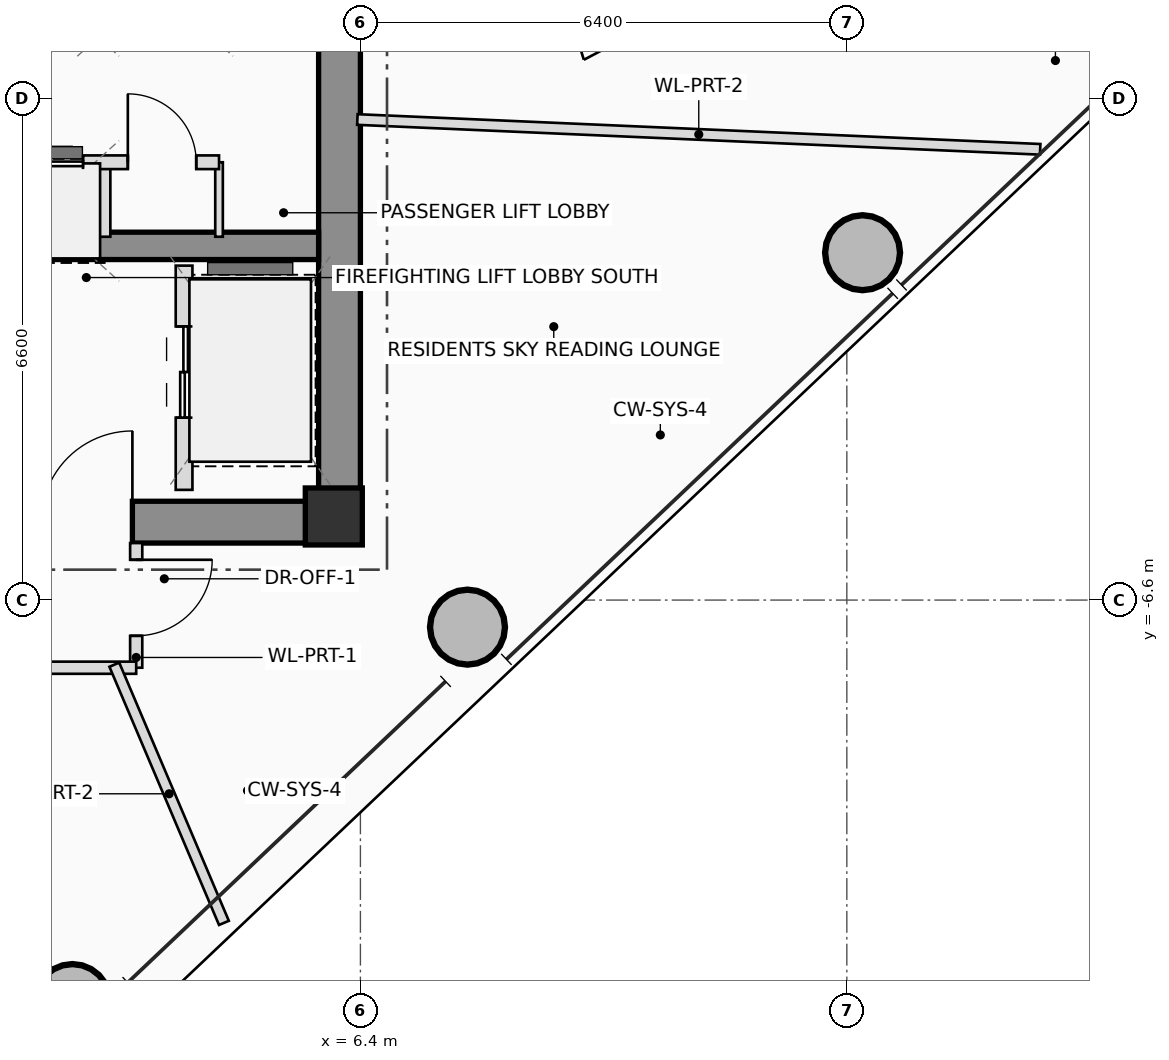
"""IFC4 building model, lengths in metres.
Left out: names, types, materials, properties, quantities, classifications, styles, units other than length and angle.
Written with IfcOpenShell. Run it as: python <this file> out.ifc"""

import sys

from ifc_helpers import new_model, si_unit, direction, frame, frame_2d, origin, origin_2d, place, context, subcontext, project, spatial, rectangle, hollow_circle, extrude, source, transform, mapped, element, fill, save


model = new_model("IFC4")
c1 = context("Model", 3, precision=1e-05, world=origin(), true_north=direction((0.0, 1.0)))
c2 = subcontext(c1, "Body", "Model", "MODEL_VIEW")
j1 = project(units=[si_unit("LENGTHUNIT", "METRE"), si_unit("PLANEANGLEUNIT", "RADIAN")], contexts=[c1])
p1 = place(None, origin())
s1 = spatial("IfcSite", under=j1, at=p1, CompositionType="ELEMENT")
p2 = place(p1, origin())
s2 = spatial("IfcBuilding", under=s1, at=p2, CompositionType="ELEMENT")
p3 = place(p2, frame((0.0, 0.0, 228.65)))
s3 = spatial("IfcBuildingStorey", under=s2, at=p3, CompositionType="ELEMENT", Elevation=228.65)
m1 = source(origin(), c2, "Body", "SweptSolid", [
    extrude(rectangle(XDim=0.75, YDim=0.75, at=origin_2d()), origin(), (0.0, 0.0, 1.0), 3.4),
])
p4 = place(p3, frame((6.05, -5.5, 0.0), z_axis=(0.0, 0.0, 1.0), x_axis=(1.0, 0.0, 0.0)))
e1 = element("IfcColumn", 1, at=p4, inside=s3, PredefinedType="COLUMN", context=c2, shape_type="MappedRepresentation", body=[
    mapped(m1, transform((0.0, 0.0, 0.0), scale=1.0)),
])
p5 = place(p3, frame((-6.4, -5.575, 0.0), z_axis=(0.0, 0.0, 1.0), x_axis=(1.0, 0.0, 0.0)))
e2 = element("IfcWall", 2, at=p5, inside=s3, PredefinedType="SHEAR", context=c2, shape_type="SweptSolid", body=[
    extrude(rectangle(XDim=12.8, YDim=0.55, at=frame_2d((6.4, 0.0))), origin(), (0.0, 0.0, 1.0), 3.4),
])
p6 = place(p5, frame((8.6, 0.0, 0.0)))
e3 = element("IfcOpeningElement", 3, at=p6, cuts=e2, PredefinedType="OPENING", context=c2, shape_type="SweptSolid", body=[
    extrude(rectangle(XDim=1.2, YDim=2.2, at=frame_2d((0.6, 1.1))), frame((0.0, 0.285, 0.0), z_axis=(0.0, -1.0, 0.0), x_axis=(1.0, 0.0, 0.0)), (0.0, 0.0, 1.0), 0.57),
])
p7 = place(p3, frame((6.125, -5.3, 0.0), z_axis=(0.0, 0.0, 1.0), x_axis=(0.0, 1.0, 0.0)))
e4 = element("IfcWall", 4, at=p7, inside=s3, PredefinedType="SHEAR", context=c2, shape_type="SweptSolid", body=[
    extrude(rectangle(XDim=10.6, YDim=0.55, at=frame_2d((5.3, 0.0))), origin(), (0.0, 0.0, 1.0), 3.4),
])
p8 = place(p3, frame((-5.85, -1.94, 0.0), z_axis=(0.0, 0.0, 1.0), x_axis=(1.0, 0.0, 0.0)))
e5 = element("IfcWall", 5, at=p8, inside=s3, PredefinedType="SHEAR", context=c2, shape_type="SweptSolid", body=[
    extrude(rectangle(XDim=11.7, YDim=0.36, at=frame_2d((5.85, 0.0))), origin(), (0.0, 0.0, 1.0), 3.4),
])
m2 = source(origin(), c2, "Body", "SweptSolid", [
    extrude(hollow_circle(Radius=0.5, WallThickness=0.04, at=origin_2d()), origin(), (0.0, 0.0, 1.0), 3.4),
])
for number, where, z_axis, x_axis in (
    (6, (2.611, -11.882, 0.0), (0.0, 0.0, 1.0), (1.0, 0.0, 0.0)),
    (7, (7.809, -6.956, 0.0), (0.0, 0.0, 1.0), (1.0, 0.0, 0.0)),
    (8, (13.007, -2.03, 0.0), (0.0, 0.0, 1.0), (1.0, 0.0, 0.0)),
):
    element("IfcColumn", number, at=place(p3, frame(where, z_axis=z_axis, x_axis=x_axis)), inside=s3, PredefinedType="COLUMN", context=c2, shape_type="MappedRepresentation", body=[
        mapped(m2, transform((0.0, 0.0, 0.0), scale=1.0)),
    ])
p9 = place(p3, frame((4.08, -5.15, 0.0), z_axis=(0.0, 0.0, 1.0), x_axis=(0.0, 1.0, 0.0)))
e9 = element("IfcWall", 9, at=p9, inside=s3, PredefinedType="PLUMBINGWALL", context=c2, shape_type="SweptSolid", body=[
    extrude(rectangle(XDim=2.95, YDim=0.22, at=frame_2d((1.475, 0.0))), origin(), (0.0, 0.0, 1.0), 3.2),
])
p10 = place(p9, frame((0.95, 0.0, 0.0)))
e10 = element("IfcOpeningElement", 10, at=p10, cuts=e9, PredefinedType="OPENING", context=c2, shape_type="SweptSolid", body=[
    extrude(rectangle(XDim=1.2, YDim=2.25, at=frame_2d((0.6, 1.125))), frame((0.0, 0.12, 0.0), z_axis=(0.0, -1.0, 0.0), x_axis=(1.0, 0.0, 0.0)), (0.0, 0.0, 1.0), 0.24),
])
p11 = place(p3, frame((3.02, -1.82, 0.0), z_axis=(0.0, 0.0, 1.0), x_axis=(0.0, 1.0, 0.0)))
e11 = element("IfcWall", 11, at=p11, inside=s3, PredefinedType="PLUMBINGWALL", context=c2, shape_type="SweptSolid", body=[
    extrude(rectangle(XDim=0.98, YDim=0.18, at=frame_2d((0.49, 0.0))), origin(), (0.0, 0.0, 1.0), 3.2),
])
p12 = place(p3, frame((4.54, -1.82, 0.0), z_axis=(0.0, 0.0, 1.0), x_axis=(0.0, 1.0, 0.0)))
e12 = element("IfcWall", 12, at=p12, inside=s3, PredefinedType="PARTITIONING", context=c2, shape_type="SweptSolid", body=[
    extrude(rectangle(XDim=0.98, YDim=0.1, at=frame_2d((0.49, 0.0))), origin(), (0.0, 0.0, 1.0), 3.2),
])
p13 = place(p3, frame((-5.68, -0.84, 0.0), z_axis=(0.0, 0.0, 1.0), x_axis=(1.0, 0.0, 0.0)))
e13 = element("IfcWall", 13, at=p13, inside=s3, PredefinedType="PLUMBINGWALL", context=c2, shape_type="SweptSolid", body=[
    extrude(rectangle(XDim=10.22, YDim=0.18, at=frame_2d((5.11, 0.0))), origin(), (0.0, 0.0, 1.0), 3.2),
])
p14 = place(p13, frame((1.88, 0.0, 0.0)))
e14 = element("IfcOpeningElement", 14, at=p14, cuts=e13, PredefinedType="OPENING", context=c2, shape_type="SweptSolid", body=[
    extrude(rectangle(XDim=0.9, YDim=2.05, at=frame_2d((0.45, 1.025))), frame((0.0, 0.1, 0.0), z_axis=(0.0, -1.0, 0.0), x_axis=(1.0, 0.0, 0.0)), (0.0, 0.0, 1.0), 0.2),
])
p15 = place(p13, frame((5.35, 0.0, 0.0)))
e15 = element("IfcOpeningElement", 15, at=p15, cuts=e13, PredefinedType="OPENING", context=c2, shape_type="SweptSolid", body=[
    extrude(rectangle(XDim=0.9, YDim=2.05, at=frame_2d((0.45, 1.025))), frame((0.0, 0.1, 0.0), z_axis=(0.0, -1.0, 0.0), x_axis=(1.0, 0.0, 0.0)), (0.0, 0.0, 1.0), 0.2),
])
p16 = place(p13, frame((7.33, 0.0, 0.0)))
e16 = element("IfcOpeningElement", 16, at=p16, cuts=e13, PredefinedType="OPENING", context=c2, shape_type="SweptSolid", body=[
    extrude(rectangle(XDim=1.1, YDim=2.2, at=frame_2d((0.55, 1.1))), frame((0.0, 0.1, 0.0), z_axis=(0.0, -1.0, 0.0), x_axis=(1.0, 0.0, 0.0)), (0.0, 0.0, 1.0), 0.2),
])
p17 = place(p13, frame((9.02, 0.0, 0.0)))
e17 = element("IfcOpeningElement", 17, at=p17, cuts=e13, PredefinedType="OPENING", context=c2, shape_type="SweptSolid", body=[
    extrude(rectangle(XDim=0.9, YDim=2.05, at=frame_2d((0.45, 1.025))), frame((0.0, 0.1, 0.0), z_axis=(0.0, -1.0, 0.0), x_axis=(1.0, 0.0, 0.0)), (0.0, 0.0, 1.0), 0.2),
])
p18 = place(p3, frame((3.45, -5.85, 0.0), z_axis=(0.0, 0.0, 1.0), x_axis=(0.0, -1.0, 0.0)))
e18 = element("IfcWall", 18, at=p18, inside=s3, PredefinedType="PARTITIONING", context=c2, shape_type="SweptSolid", body=[
    extrude(rectangle(XDim=1.64, YDim=0.16, at=frame_2d((0.82, 0.0))), origin(), (0.0, 0.0, 1.0), 3.2),
])
p19 = place(p18, frame((0.22, 0.0, 0.0)))
e19 = element("IfcOpeningElement", 19, at=p19, cuts=e18, PredefinedType="OPENING", context=c2, shape_type="SweptSolid", body=[
    extrude(rectangle(XDim=1.0, YDim=2.25, at=frame_2d((0.5, 1.125))), frame((0.0, 0.09, 0.0), z_axis=(0.0, -1.0, 0.0), x_axis=(1.0, 0.0, 0.0)), (0.0, 0.0, 1.0), 0.18),
])
p20 = place(p3, frame((3.45, -7.49, 0.0), z_axis=(0.0, 0.0, 1.0), x_axis=(-1.0, 0.0, 0.0)))
e20 = element("IfcWall", 20, at=p20, inside=s3, PredefinedType="PARTITIONING", context=c2, shape_type="SweptSolid", body=[
    extrude(rectangle(XDim=9.81, YDim=0.16, at=frame_2d((4.905, 0.0))), origin(), (0.0, 0.0, 1.0), 2.605),
])
p21 = place(p20, frame((1.911, 0.0, 0.0)))
e21 = element("IfcOpeningElement", 21, at=p21, cuts=e20, PredefinedType="OPENING", context=c2, shape_type="SweptSolid", body=[
    extrude(rectangle(XDim=1.0, YDim=2.25, at=frame_2d((0.5, 1.125))), frame((0.0, 0.09, 0.0), z_axis=(0.0, -1.0, 0.0), x_axis=(1.0, 0.0, 0.0)), (0.0, 0.0, 1.0), 0.18),
])
p22 = place(p20, frame((6.583, 0.0, 0.0)))
e22 = element("IfcOpeningElement", 22, at=p22, cuts=e20, PredefinedType="OPENING", context=c2, shape_type="SweptSolid", body=[
    extrude(rectangle(XDim=1.0, YDim=2.25, at=frame_2d((0.5, 1.125))), frame((0.0, 0.09, 0.0), z_axis=(0.0, -1.0, 0.0), x_axis=(1.0, 0.0, 0.0)), (0.0, 0.0, 1.0), 0.18),
])
p23 = place(p3, frame((6.36, -0.278, 0.0), z_axis=(0.0, 0.0, 1.0), x_axis=(0.99904773846, -0.043630451279, 0.0)))
e23 = element("IfcWall", 23, at=p23, inside=s3, PredefinedType="PARTITIONING", context=c2, shape_type="SweptSolid", body=[
    extrude(rectangle(XDim=8.992, YDim=0.14, at=frame_2d((4.496, 0.0))), origin(), (0.0, 0.0, 1.0), 2.605),
])
p24 = place(p3, frame((3.162, -7.45, 0.0), z_axis=(0.0, 0.0, 1.0), x_axis=(0.39072313519, -0.920508246366, 0.0)))
e24 = element("IfcWall", 24, at=p24, inside=s3, PredefinedType="PARTITIONING", context=c2, shape_type="SweptSolid", body=[
    extrude(rectangle(XDim=3.69, YDim=0.14, at=frame_2d((1.845, 0.0))), origin(), (0.0, 0.0, 1.0), 2.605),
])
p25 = place(p6, origin())
e25 = element("IfcDoor", 25, at=p25, inside=s3, OperationType="SINGLE_SWING_RIGHT", PredefinedType="DOOR", context=c2, shape_type="SweptSolid", body=[
    extrude(rectangle(XDim=1.2, YDim=2.2, at=frame_2d((0.6, 1.1))), frame((0.0, 0.025, 0.0), z_axis=(0.0, -1.0, 0.0), x_axis=(1.0, 0.0, 0.0)), (0.0, 0.0, 1.0), 0.05),
])
fill(e3, e25)
p26 = place(p10, origin())
e26 = element("IfcDoor", 26, at=p26, inside=s3, OperationType="DOUBLE_DOOR_SLIDING", PredefinedType="DOOR", context=c2, shape_type="SweptSolid", body=[
    extrude(rectangle(XDim=1.2, YDim=2.25, at=frame_2d((0.6, 1.125))), frame((0.0, 0.025, 0.0), z_axis=(0.0, -1.0, 0.0), x_axis=(1.0, 0.0, 0.0)), (0.0, 0.0, 1.0), 0.05),
])
fill(e10, e26)
p27 = place(p16, origin())
e27 = element("IfcDoor", 27, at=p27, inside=s3, OperationType="DOUBLE_DOOR_SLIDING", PredefinedType="DOOR", context=c2, shape_type="SweptSolid", body=[
    extrude(rectangle(XDim=1.1, YDim=2.2, at=frame_2d((0.55, 1.1))), frame((0.0, 0.025, 0.0), z_axis=(0.0, -1.0, 0.0), x_axis=(1.0, 0.0, 0.0)), (0.0, 0.0, 1.0), 0.05),
])
fill(e16, e27)
p28 = place(p17, origin())
e28 = element("IfcDoor", 28, at=p28, inside=s3, OperationType="SINGLE_SWING_LEFT", PredefinedType="DOOR", context=c2, shape_type="SweptSolid", body=[
    extrude(rectangle(XDim=0.9, YDim=2.05, at=frame_2d((0.45, 1.025))), frame((0.0, 0.025, 0.0), z_axis=(0.0, -1.0, 0.0), x_axis=(1.0, 0.0, 0.0)), (0.0, 0.0, 1.0), 0.05),
])
fill(e17, e28)
p29 = place(p19, origin())
e29 = element("IfcDoor", 29, at=p29, inside=s3, OperationType="SINGLE_SWING_LEFT", PredefinedType="DOOR", context=c2, shape_type="SweptSolid", body=[
    extrude(rectangle(XDim=1.0, YDim=2.25, at=frame_2d((0.5, 1.125))), frame((0.0, 0.025, 0.0), z_axis=(0.0, -1.0, 0.0), x_axis=(1.0, 0.0, 0.0)), (0.0, 0.0, 1.0), 0.05),
])
fill(e19, e29)
save(model, sys.argv[1])
